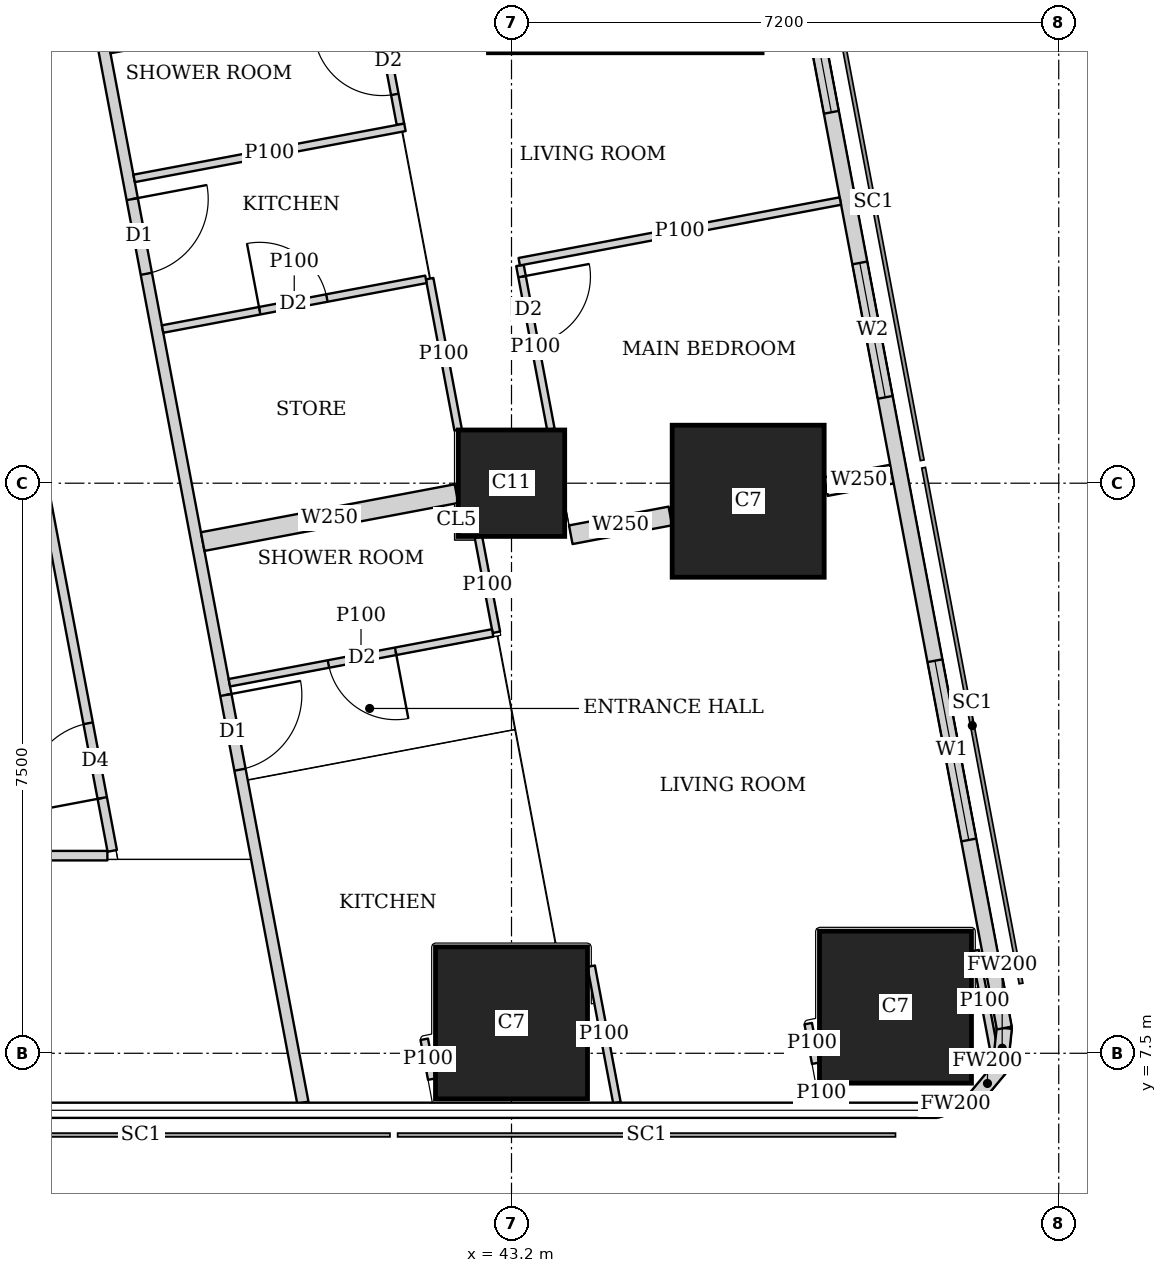
"""IFC4 building model, lengths in metres.
Left out: names, types, materials, properties, quantities, classifications, styles, units other than length and angle.
Written with IfcOpenShell. Run it as: python <this file> out.ifc"""

import sys

from ifc_helpers import new_model, si_unit, direction, frame, frame_2d, origin, origin_2d, place, context, subcontext, project, spatial, rectangle, extrude, element, fill, save


model = new_model("IFC4")
c1 = context("Model", 3, precision=1e-05, world=origin(), true_north=direction((0.0, 1.0)))
c2 = subcontext(c1, "Body", "Model", "MODEL_VIEW")
j1 = project(units=[si_unit("LENGTHUNIT", "METRE"), si_unit("PLANEANGLEUNIT", "RADIAN")], contexts=[c1])
p1 = place(None, origin())
s1 = spatial("IfcSite", under=j1, at=p1, CompositionType="ELEMENT")
p2 = place(p1, origin())
s2 = spatial("IfcBuilding", under=s1, at=p2, CompositionType="ELEMENT")
p3 = place(p2, frame((0.0, 0.0, 259.1)))
s3 = spatial("IfcBuildingStorey", under=s2, at=p3, CompositionType="ELEMENT", Elevation=259.1)
for number, where, z_axis, x_axis in (
    (1, (43.2, 7.9, 0.0), (0.0, 0.0, 1.0), (1.0, 0.0, 0.0)),
    (2, (48.252, 8.107, 0.0), (0.0, 0.0, 1.0), (1.0, 0.0, 0.0)),
):
    element("IfcColumn", number, at=place(p3, frame(where, z_axis=z_axis, x_axis=x_axis)), inside=s3, PredefinedType="COLUMN", context=c2, shape_type="SweptSolid", body=[
        extrude(rectangle(XDim=2.0, YDim=2.0, at=origin_2d()), origin(), (0.0, 0.0, 1.0), 3.75),
    ])
p4 = place(p3, frame((43.2, 15.0, 0.0), z_axis=(0.0, 0.0, 1.0), x_axis=(1.0, 0.0, 0.0)))
e3 = element("IfcColumn", 3, at=p4, inside=s3, PredefinedType="COLUMN", context=c2, shape_type="SweptSolid", body=[
    extrude(rectangle(XDim=1.4, YDim=1.4, at=origin_2d()), origin(), (0.0, 0.0, 1.0), 3.75),
])
p5 = place(p3, frame((46.314, 14.763, 0.0), z_axis=(0.0, 0.0, 1.0), x_axis=(1.0, 0.0, 0.0)))
e4 = element("IfcColumn", 4, at=p5, inside=s3, PredefinedType="COLUMN", context=c2, shape_type="SweptSolid", body=[
    extrude(rectangle(XDim=2.0, YDim=2.0, at=origin_2d()), origin(), (0.0, 0.0, 1.0), 3.75),
])
p6 = place(p3, frame((44.697, 22.263, 0.0), z_axis=(0.0, 0.0, 1.0), x_axis=(1.0, 0.0, 0.0)))
e5 = element("IfcColumn", 5, at=p6, inside=s3, PredefinedType="COLUMN", context=c2, shape_type="SweptSolid", body=[
    extrude(rectangle(XDim=3.6, YDim=3.2, at=origin_2d()), origin(), (0.0, 0.0, 1.0), 3.75),
])
p7 = place(p3, frame((48.787, 6.75, 0.0), z_axis=(0.0, 0.0, 1.0), x_axis=(0.957282247819, 0.289155145225, 0.0)))
e6 = element("IfcWall", 6, at=p7, inside=s3, PredefinedType="SOLIDWALL", context=c2, shape_type="SweptSolid", body=[
    extrude(rectangle(XDim=0.533, YDim=0.2, at=frame_2d((0.266, 0.0))), origin(), (0.0, 0.0, 1.0), 3.5),
])
p8 = place(p3, frame((49.297, 6.904, 0.0), z_axis=(0.0, 0.0, 1.0), x_axis=(0.639255849474, 0.768994121508, 0.0)))
e7 = element("IfcWall", 7, at=p8, inside=s3, PredefinedType="SOLIDWALL", context=c2, shape_type="SweptSolid", body=[
    extrude(rectangle(XDim=0.518, YDim=0.2, at=frame_2d((0.259, 0.0))), origin(), (0.0, 0.0, 1.0), 3.5),
])
p9 = place(p3, frame((49.628, 7.302, 0.0), z_axis=(0.0, 0.0, 1.0), x_axis=(0.105352390132, 0.994434952068, 0.0)))
e8 = element("IfcWall", 8, at=p9, inside=s3, PredefinedType="SOLIDWALL", context=c2, shape_type="SweptSolid", body=[
    extrude(rectangle(XDim=0.533, YDim=0.2, at=frame_2d((0.267, 0.0))), origin(), (0.0, 0.0, 1.0), 3.5),
])
p10 = place(p3, frame((49.684, 7.832, 0.0), z_axis=(0.0, 0.0, 1.0), x_axis=(-0.185616669694, 0.982622232565, 0.0)))
e9 = element("IfcWall", 9, at=p10, inside=s3, PredefinedType="SOLIDWALL", context=c2, shape_type="SweptSolid", body=[
    extrude(rectangle(XDim=36.0, YDim=0.2, at=frame_2d((18.0, 0.0))), origin(), (0.0, 0.0, 1.0), 3.5),
])
p11 = place(p10, frame((2.518, 0.0, 0.9)))
e10 = element("IfcOpeningElement", 10, at=p11, cuts=e9, PredefinedType="OPENING", context=c2, shape_type="SweptSolid", body=[
    extrude(rectangle(XDim=2.4, YDim=1.5, at=frame_2d((1.2, 0.75))), frame((0.0, 0.11, 0.0), z_axis=(0.0, -1.0, 0.0), x_axis=(1.0, 0.0, 0.0)), (0.0, 0.0, 1.0), 0.22),
])
p12 = place(p10, frame((8.444, 0.0, 0.9)))
e11 = element("IfcOpeningElement", 11, at=p12, cuts=e9, PredefinedType="OPENING", context=c2, shape_type="SweptSolid", body=[
    extrude(rectangle(XDim=1.8, YDim=1.5, at=frame_2d((0.9, 0.75))), frame((0.0, 0.11, 0.0), z_axis=(0.0, -1.0, 0.0), x_axis=(1.0, 0.0, 0.0)), (0.0, 0.0, 1.0), 0.22),
])
p13 = place(p10, frame((12.261, 0.0, 0.9)))
e12 = element("IfcOpeningElement", 12, at=p13, cuts=e9, PredefinedType="OPENING", context=c2, shape_type="SweptSolid", body=[
    extrude(rectangle(XDim=1.8, YDim=1.5, at=frame_2d((0.9, 0.75))), frame((0.0, 0.11, 0.0), z_axis=(0.0, -1.0, 0.0), x_axis=(1.0, 0.0, 0.0)), (0.0, 0.0, 1.0), 0.22),
])
p14 = place(p10, frame((16.078, 0.0, 0.9)))
e13 = element("IfcOpeningElement", 13, at=p14, cuts=e9, PredefinedType="OPENING", context=c2, shape_type="SweptSolid", body=[
    extrude(rectangle(XDim=1.8, YDim=1.5, at=frame_2d((0.9, 0.75))), frame((0.0, 0.11, 0.0), z_axis=(0.0, -1.0, 0.0), x_axis=(1.0, 0.0, 0.0)), (0.0, 0.0, 1.0), 0.22),
])
p15 = place(p10, frame((19.894, 0.0, 0.9)))
e14 = element("IfcOpeningElement", 14, at=p15, cuts=e9, PredefinedType="OPENING", context=c2, shape_type="SweptSolid", body=[
    extrude(rectangle(XDim=1.8, YDim=1.5, at=frame_2d((0.9, 0.75))), frame((0.0, 0.11, 0.0), z_axis=(0.0, -1.0, 0.0), x_axis=(1.0, 0.0, 0.0)), (0.0, 0.0, 1.0), 0.22),
])
p16 = place(p10, frame((23.71, 0.0, 0.9)))
e15 = element("IfcOpeningElement", 15, at=p16, cuts=e9, PredefinedType="OPENING", context=c2, shape_type="SweptSolid", body=[
    extrude(rectangle(XDim=1.8, YDim=1.5, at=frame_2d((0.9, 0.75))), frame((0.0, 0.11, 0.0), z_axis=(0.0, -1.0, 0.0), x_axis=(1.0, 0.0, 0.0)), (0.0, 0.0, 1.0), 0.22),
])
p17 = place(p10, frame((27.526, 0.0, 0.9)))
e16 = element("IfcOpeningElement", 16, at=p17, cuts=e9, PredefinedType="OPENING", context=c2, shape_type="SweptSolid", body=[
    extrude(rectangle(XDim=1.8, YDim=1.5, at=frame_2d((0.9, 0.75))), frame((0.0, 0.11, 0.0), z_axis=(0.0, -1.0, 0.0), x_axis=(1.0, 0.0, 0.0)), (0.0, 0.0, 1.0), 0.22),
])
p18 = place(p10, frame((32.046, 0.0, 0.9)))
e17 = element("IfcOpeningElement", 17, at=p18, cuts=e9, PredefinedType="OPENING", context=c2, shape_type="SweptSolid", body=[
    extrude(rectangle(XDim=1.8, YDim=1.5, at=frame_2d((0.9, 0.75))), frame((0.0, 0.11, 0.0), z_axis=(0.0, -1.0, 0.0), x_axis=(1.0, 0.0, 0.0)), (0.0, 0.0, 1.0), 0.22),
])
p19 = place(p3, frame((33.781, 42.186, 0.0), z_axis=(0.0, 0.0, 1.0), x_axis=(0.185593518645, -0.9826266055, 0.0)))
e18 = element("IfcWall", 18, at=p19, inside=s3, PredefinedType="SOLIDWALL", context=c2, shape_type="SweptSolid", body=[
    extrude(rectangle(XDim=35.961, YDim=0.15, at=frame_2d((17.98, 0.0))), origin(), (0.0, 0.0, 1.0), 2.5),
])
p20 = place(p19, frame((7.183, 0.0, 0.0)))
e19 = element("IfcOpeningElement", 19, at=p20, cuts=e18, PredefinedType="OPENING", context=c2, shape_type="SweptSolid", body=[
    extrude(rectangle(XDim=1.0, YDim=2.1, at=frame_2d((0.5, 1.05))), frame((0.0, 0.085, 0.0), z_axis=(0.0, -1.0, 0.0), x_axis=(1.0, 0.0, 0.0)), (0.0, 0.0, 1.0), 0.17),
])
p21 = place(p19, frame((11.76, 0.0, 0.0)))
e20 = element("IfcOpeningElement", 20, at=p21, cuts=e18, PredefinedType="OPENING", context=c2, shape_type="SweptSolid", body=[
    extrude(rectangle(XDim=1.0, YDim=2.1, at=frame_2d((0.5, 1.05))), frame((0.0, 0.085, 0.0), z_axis=(0.0, -1.0, 0.0), x_axis=(1.0, 0.0, 0.0)), (0.0, 0.0, 1.0), 0.17),
])
p22 = place(p19, frame((23.863, 0.0, 0.0)))
e21 = element("IfcOpeningElement", 21, at=p22, cuts=e18, PredefinedType="OPENING", context=c2, shape_type="SweptSolid", body=[
    extrude(rectangle(XDim=1.0, YDim=2.1, at=frame_2d((0.5, 1.05))), frame((0.0, 0.085, 0.0), z_axis=(0.0, -1.0, 0.0), x_axis=(1.0, 0.0, 0.0)), (0.0, 0.0, 1.0), 0.17),
])
p23 = place(p19, frame((30.502, 0.0, 0.0)))
e22 = element("IfcOpeningElement", 22, at=p23, cuts=e18, PredefinedType="OPENING", context=c2, shape_type="SweptSolid", body=[
    extrude(rectangle(XDim=1.0, YDim=2.1, at=frame_2d((0.5, 1.05))), frame((0.0, 0.085, 0.0), z_axis=(0.0, -1.0, 0.0), x_axis=(1.0, 0.0, 0.0)), (0.0, 0.0, 1.0), 0.17),
])
p24 = place(p3, frame((44.248, 8.646, 0.0), z_axis=(0.0, 0.0, 1.0), x_axis=(0.185417594585, -0.982659816833, 0.0)))
e23 = element("IfcWall", 23, at=p24, inside=s3, PredefinedType="PARTITIONING", context=c2, shape_type="SweptSolid", body=[
    extrude(rectangle(XDim=1.828, YDim=0.1, at=frame_2d((0.914, 0.0))), origin(), (0.0, 0.0, 1.0), 2.05),
])
p25 = place(p3, frame((42.151, 7.16, 0.0), z_axis=(0.0, 0.0, 1.0), x_axis=(-0.185366164644, 0.982669519729, 0.0)))
e24 = element("IfcWall", 24, at=p25, inside=s3, PredefinedType="PARTITIONING", context=c2, shape_type="SweptSolid", body=[
    extrude(rectangle(XDim=0.533, YDim=0.1, at=frame_2d((0.267, 0.0))), origin(), (0.0, 0.0, 1.0), 2.5),
])
p26 = place(p3, frame((49.3, 8.851, 0.0), z_axis=(0.0, 0.0, 1.0), x_axis=(0.18581620423, -0.982584519645, 0.0)))
e25 = element("IfcWall", 25, at=p26, inside=s3, PredefinedType="PARTITIONING", context=c2, shape_type="SweptSolid", body=[
    extrude(rectangle(XDim=1.351, YDim=0.1, at=frame_2d((0.675, 0.0))), origin(), (0.0, 0.0, 1.0), 3.5),
])
p27 = place(p3, frame((47.301, 6.85, 0.0), z_axis=(0.0, 0.0, 1.0), x_axis=(-0.187513903188, 0.982261948826, 0.0)))
e26 = element("IfcWall", 26, at=p27, inside=s3, PredefinedType="PARTITIONING", context=c2, shape_type="SweptSolid", body=[
    extrude(rectangle(XDim=0.251, YDim=0.1, at=frame_2d((0.125, 0.0))), origin(), (0.0, 0.0, 1.0), 3.5),
])
p28 = place(p3, frame((47.203, 7.369, 0.0), z_axis=(0.0, 0.0, 1.0), x_axis=(-0.186456243114, 0.982463266185, 0.0)))
e27 = element("IfcWall", 27, at=p28, inside=s3, PredefinedType="PARTITIONING", context=c2, shape_type="SweptSolid", body=[
    extrude(rectangle(XDim=0.53, YDim=0.1, at=frame_2d((0.265, 0.0))), origin(), (0.0, 0.0, 1.0), 2.05),
])
p29 = place(p3, frame((41.437, 21.319, 0.0), z_axis=(0.0, 0.0, 1.0), x_axis=(0.185793689589, -0.982588777113, 0.0)))
e28 = element("IfcWall", 28, at=p29, inside=s3, PredefinedType="PARTITIONING", context=c2, shape_type="SweptSolid", body=[
    extrude(rectangle(XDim=1.625, YDim=0.1, at=frame_2d((0.813, 0.0))), origin(), (0.0, 0.0, 1.0), 3.5),
])
p30 = place(p29, frame((0.325, 0.0, 0.0)))
e29 = element("IfcOpeningElement", 29, at=p30, cuts=e28, PredefinedType="OPENING", context=c2, shape_type="SweptSolid", body=[
    extrude(rectangle(XDim=0.9, YDim=2.1, at=frame_2d((0.45, 1.05))), frame((0.0, 0.06, 0.0), z_axis=(0.0, -1.0, 0.0), x_axis=(1.0, 0.0, 0.0)), (0.0, 0.0, 1.0), 0.12),
])
p31 = place(p3, frame((41.798, 19.682, 0.0), z_axis=(0.0, 0.0, 1.0), x_axis=(-0.982681091817, -0.185304807776, 0.0)))
e30 = element("IfcWall", 30, at=p31, inside=s3, PredefinedType="PARTITIONING", context=c2, shape_type="SweptSolid", body=[
    extrude(rectangle(XDim=3.626, YDim=0.1, at=frame_2d((1.813, 0.0))), origin(), (0.0, 0.0, 1.0), 3.5),
])
p32 = place(p3, frame((43.311, 17.865, 0.0), z_axis=(0.0, 0.0, 1.0), x_axis=(0.185572140257, -0.982630643101, 0.0)))
e31 = element("IfcWall", 31, at=p32, inside=s3, PredefinedType="PARTITIONING", context=c2, shape_type="SweptSolid", body=[
    extrude(rectangle(XDim=2.193, YDim=0.1, at=frame_2d((1.097, 0.0))), origin(), (0.0, 0.0, 1.0), 3.5),
])
p33 = place(p32, frame((0.15, 0.0, 0.0)))
e32 = element("IfcOpeningElement", 32, at=p33, cuts=e31, PredefinedType="OPENING", context=c2, shape_type="SweptSolid", body=[
    extrude(rectangle(XDim=0.9, YDim=2.1, at=frame_2d((0.45, 1.05))), frame((0.0, 0.06, 0.0), z_axis=(0.0, -1.0, 0.0), x_axis=(1.0, 0.0, 0.0)), (0.0, 0.0, 1.0), 0.12),
])
p34 = place(p3, frame((42.123, 17.691, 0.0), z_axis=(0.0, 0.0, 1.0), x_axis=(0.185183804812, -0.98270390171, 0.0)))
e33 = element("IfcWall", 33, at=p34, inside=s3, PredefinedType="PARTITIONING", context=c2, shape_type="SweptSolid", body=[
    extrude(rectangle(XDim=2.025, YDim=0.1, at=frame_2d((1.012, 0.0))), origin(), (0.0, 0.0, 1.0), 3.5),
])
p35 = place(p3, frame((47.527, 18.712, 0.0), z_axis=(0.0, 0.0, 1.0), x_axis=(-0.982633535512, -0.185556823879, 0.0)))
e34 = element("IfcWall", 34, at=p35, inside=s3, PredefinedType="PARTITIONING", context=c2, shape_type="SweptSolid", body=[
    extrude(rectangle(XDim=4.3, YDim=0.1, at=frame_2d((2.15, 0.0))), origin(), (0.0, 0.0, 1.0), 2.5),
])
p36 = place(p3, frame((42.074, 17.682, 0.0), z_axis=(0.0, 0.0, 1.0), x_axis=(-0.982660701716, -0.185412904897, 0.0)))
e35 = element("IfcWall", 35, at=p36, inside=s3, PredefinedType="PARTITIONING", context=c2, shape_type="SweptSolid", body=[
    extrude(rectangle(XDim=3.526, YDim=0.1, at=frame_2d((1.763, 0.0))), origin(), (0.0, 0.0, 1.0), 3.5),
])
p37 = place(p36, frame((1.326, 0.0, 0.0)))
e36 = element("IfcOpeningElement", 36, at=p37, cuts=e35, PredefinedType="OPENING", context=c2, shape_type="SweptSolid", body=[
    extrude(rectangle(XDim=0.9, YDim=2.1, at=frame_2d((0.45, 1.05))), frame((0.0, 0.06, 0.0), z_axis=(0.0, -1.0, 0.0), x_axis=(1.0, 0.0, 0.0)), (0.0, 0.0, 1.0), 0.12),
])
p38 = place(p3, frame((42.593, 21.665, 0.0), z_axis=(0.0, 0.0, 1.0), x_axis=(-0.982635807605, -0.185544791394, 0.0)))
e37 = element("IfcWall", 37, at=p38, inside=s3, PredefinedType="SOLIDWALL", context=c2, shape_type="SweptSolid", body=[
    extrude(rectangle(XDim=4.775, YDim=0.25, at=frame_2d((2.388, 0.0))), origin(), (0.0, 0.0, 1.0), 2.5),
])
p39 = place(p3, frame((42.765, 14.29, 0.0), z_axis=(0.0, 0.0, 1.0), x_axis=(0.185446293138, -0.982654401283, 0.0)))
e38 = element("IfcWall", 38, at=p39, inside=s3, PredefinedType="PARTITIONING", context=c2, shape_type="SweptSolid", body=[
    extrude(rectangle(XDim=1.273, YDim=0.1, at=frame_2d((0.636, 0.0))), origin(), (0.0, 0.0, 1.0), 3.5),
])
p40 = place(p3, frame((42.952, 13.03, 0.0), z_axis=(0.0, 0.0, 1.0), x_axis=(-0.982585626838, -0.185810349366, 0.0)))
e39 = element("IfcWall", 39, at=p40, inside=s3, PredefinedType="PARTITIONING", context=c2, shape_type="SweptSolid", body=[
    extrude(rectangle(XDim=3.525, YDim=0.1, at=frame_2d((1.763, 0.0))), origin(), (0.0, 0.0, 1.0), 3.5),
])
p41 = place(p40, frame((1.299, 0.0, 0.0)))
e40 = element("IfcOpeningElement", 40, at=p41, cuts=e39, PredefinedType="OPENING", context=c2, shape_type="SweptSolid", body=[
    extrude(rectangle(XDim=0.9, YDim=2.1, at=frame_2d((0.45, 1.05))), frame((0.0, 0.06, 0.0), z_axis=(0.0, -1.0, 0.0), x_axis=(1.0, 0.0, 0.0)), (0.0, 0.0, 1.0), 0.12),
])
p42 = place(p3, frame((48.206, 15.12, 0.0), z_axis=(0.0, 0.0, 1.0), x_axis=(-0.982608419258, -0.185689780017, 0.0)))
e41 = element("IfcWall", 41, at=p42, inside=s3, PredefinedType="SOLIDWALL", context=c2, shape_type="SweptSolid", body=[
    extrude(rectangle(XDim=0.884, YDim=0.25, at=frame_2d((0.442, 0.0))), origin(), (0.0, 0.0, 1.0), 3.5),
])
p43 = place(p3, frame((45.29, 14.569, 0.0), z_axis=(0.0, 0.0, 1.0), x_axis=(-0.982676759201, -0.185327782391, 0.0)))
e42 = element("IfcWall", 42, at=p43, inside=s3, PredefinedType="SOLIDWALL", context=c2, shape_type="SweptSolid", body=[
    extrude(rectangle(XDim=1.333, YDim=0.25, at=frame_2d((0.667, 0.0))), origin(), (0.0, 0.0, 1.0), 3.5),
])
p44 = place(p3, frame((42.476, 14.863, 0.0), z_axis=(0.0, 0.0, 1.0), x_axis=(-0.982603567712, -0.185715450942, 0.0)))
e43 = element("IfcWall", 43, at=p44, inside=s3, PredefinedType="SOLIDWALL", context=c2, shape_type="SweptSolid", body=[
    extrude(rectangle(XDim=3.398, YDim=0.25, at=frame_2d((1.699, 0.0))), origin(), (0.0, 0.0, 1.0), 3.5),
])
p45 = place(p3, frame((28.95, 10.1, 0.0), z_axis=(0.0, 0.0, 1.0), x_axis=(1.0, 0.0, 0.0)))
e44 = element("IfcWall", 44, at=p45, inside=s3, PredefinedType="PARTITIONING", context=c2, shape_type="SweptSolid", body=[
    extrude(rectangle(XDim=8.933, YDim=0.125, at=frame_2d((4.467, 0.0))), origin(), (0.0, 0.0, 1.0), 3.5),
])
p46 = place(p3, frame((37.947, 10.163, 0.0), z_axis=(0.0, 0.0, 1.0), x_axis=(-0.185589250699, 0.982627411599, 0.0)))
e45 = element("IfcWall", 45, at=p46, inside=s3, PredefinedType="PARTITIONING", context=c2, shape_type="SweptSolid", body=[
    extrude(rectangle(XDim=12.555, YDim=0.125, at=frame_2d((6.277, 0.0))), origin(), (0.0, 0.0, 1.0), 2.5),
])
p47 = place(p46, frame((0.708, 0.0, 0.0)))
e46 = element("IfcOpeningElement", 46, at=p47, cuts=e45, PredefinedType="OPENING", context=c2, shape_type="SweptSolid", body=[
    extrude(rectangle(XDim=1.0, YDim=2.1, at=frame_2d((0.5, 1.05))), frame((0.0, 0.073, 0.0), z_axis=(0.0, -1.0, 0.0), x_axis=(1.0, 0.0, 0.0)), (0.0, 0.0, 1.0), 0.145),
])
p48 = place(p46, frame((5.9, 0.0, 0.0)))
e47 = element("IfcOpeningElement", 47, at=p48, cuts=e45, PredefinedType="OPENING", context=c2, shape_type="SweptSolid", body=[
    extrude(rectangle(XDim=1.0, YDim=2.1, at=frame_2d((0.5, 1.05))), frame((0.0, 0.073, 0.0), z_axis=(0.0, -1.0, 0.0), x_axis=(1.0, 0.0, 0.0)), (0.0, 0.0, 1.0), 0.145),
])
p49 = place(p46, frame((9.562, 0.0, 0.0)))
e48 = element("IfcOpeningElement", 48, at=p49, cuts=e45, PredefinedType="OPENING", context=c2, shape_type="SweptSolid", body=[
    extrude(rectangle(XDim=1.0, YDim=2.1, at=frame_2d((0.5, 1.05))), frame((0.0, 0.073, 0.0), z_axis=(0.0, -1.0, 0.0), x_axis=(1.0, 0.0, 0.0)), (0.0, 0.0, 1.0), 0.145),
])
p50 = place(p11, origin())
e49 = element("IfcWindow", 49, at=p50, inside=s3, PartitioningType="SINGLE_PANEL", PredefinedType="WINDOW", context=c2, shape_type="SweptSolid", body=[
    extrude(rectangle(XDim=2.4, YDim=1.5, at=frame_2d((1.2, 0.75))), frame((0.0, 0.03, 0.0), z_axis=(0.0, -1.0, 0.0), x_axis=(1.0, 0.0, 0.0)), (0.0, 0.0, 1.0), 0.06),
])
fill(e10, e49)
p51 = place(p12, origin())
e50 = element("IfcWindow", 50, at=p51, inside=s3, PartitioningType="SINGLE_PANEL", PredefinedType="WINDOW", context=c2, shape_type="SweptSolid", body=[
    extrude(rectangle(XDim=1.8, YDim=1.5, at=frame_2d((0.9, 0.75))), frame((0.0, 0.03, 0.0), z_axis=(0.0, -1.0, 0.0), x_axis=(1.0, 0.0, 0.0)), (0.0, 0.0, 1.0), 0.06),
])
fill(e11, e50)
p52 = place(p13, origin())
e51 = element("IfcWindow", 51, at=p52, inside=s3, PartitioningType="SINGLE_PANEL", PredefinedType="WINDOW", context=c2, shape_type="SweptSolid", body=[
    extrude(rectangle(XDim=1.8, YDim=1.5, at=frame_2d((0.9, 0.75))), frame((0.0, 0.03, 0.0), z_axis=(0.0, -1.0, 0.0), x_axis=(1.0, 0.0, 0.0)), (0.0, 0.0, 1.0), 0.06),
])
fill(e12, e51)
p53 = place(p30, origin())
e52 = element("IfcDoor", 52, at=p53, inside=s3, OperationType="SINGLE_SWING_RIGHT", PredefinedType="DOOR", context=c2, shape_type="SweptSolid", body=[
    extrude(rectangle(XDim=0.9, YDim=2.1, at=frame_2d((0.45, 1.05))), frame((0.0, 0.025, 0.0), z_axis=(0.0, -1.0, 0.0), x_axis=(1.0, 0.0, 0.0)), (0.0, 0.0, 1.0), 0.05),
])
fill(e29, e52)
p54 = place(p33, origin())
e53 = element("IfcDoor", 53, at=p54, inside=s3, OperationType="SINGLE_SWING_LEFT", PredefinedType="DOOR", context=c2, shape_type="SweptSolid", body=[
    extrude(rectangle(XDim=0.9, YDim=2.1, at=frame_2d((0.45, 1.05))), frame((0.0, 0.025, 0.0), z_axis=(0.0, -1.0, 0.0), x_axis=(1.0, 0.0, 0.0)), (0.0, 0.0, 1.0), 0.05),
])
fill(e32, e53)
p55 = place(p22, origin())
e54 = element("IfcDoor", 54, at=p55, inside=s3, OperationType="SINGLE_SWING_LEFT", PredefinedType="DOOR", context=c2, shape_type="SweptSolid", body=[
    extrude(rectangle(XDim=1.0, YDim=2.1, at=frame_2d((0.5, 1.05))), frame((0.0, 0.025, 0.0), z_axis=(0.0, -1.0, 0.0), x_axis=(1.0, 0.0, 0.0)), (0.0, 0.0, 1.0), 0.05),
])
fill(e21, e54)
p56 = place(p41, origin())
e55 = element("IfcDoor", 55, at=p56, inside=s3, OperationType="SINGLE_SWING_LEFT", PredefinedType="DOOR", context=c2, shape_type="SweptSolid", body=[
    extrude(rectangle(XDim=0.9, YDim=2.1, at=frame_2d((0.45, 1.05))), frame((0.0, 0.025, 0.0), z_axis=(0.0, -1.0, 0.0), x_axis=(1.0, 0.0, 0.0)), (0.0, 0.0, 1.0), 0.05),
])
fill(e40, e55)
p57 = place(p23, origin())
e56 = element("IfcDoor", 56, at=p57, inside=s3, OperationType="SINGLE_SWING_LEFT", PredefinedType="DOOR", context=c2, shape_type="SweptSolid", body=[
    extrude(rectangle(XDim=1.0, YDim=2.1, at=frame_2d((0.5, 1.05))), frame((0.0, 0.025, 0.0), z_axis=(0.0, -1.0, 0.0), x_axis=(1.0, 0.0, 0.0)), (0.0, 0.0, 1.0), 0.05),
])
fill(e22, e56)
p58 = place(p37, origin())
e57 = element("IfcDoor", 57, at=p58, inside=s3, OperationType="SINGLE_SWING_LEFT", PredefinedType="DOOR", context=c2, shape_type="SweptSolid", body=[
    extrude(rectangle(XDim=0.9, YDim=2.1, at=frame_2d((0.45, 1.05))), frame((0.0, 0.025, 0.0), z_axis=(0.0, -1.0, 0.0), x_axis=(1.0, 0.0, 0.0)), (0.0, 0.0, 1.0), 0.05),
])
fill(e36, e57)
p59 = place(p47, origin())
e58 = element("IfcDoor", 58, at=p59, inside=s3, OperationType="SINGLE_SWING_LEFT", PredefinedType="DOOR", context=c2, shape_type="SweptSolid", body=[
    extrude(rectangle(XDim=1.0, YDim=2.1, at=frame_2d((0.5, 1.05))), frame((0.0, 0.025, 0.0), z_axis=(0.0, -1.0, 0.0), x_axis=(1.0, 0.0, 0.0)), (0.0, 0.0, 1.0), 0.05),
])
fill(e46, e58)
save(model, sys.argv[1])
